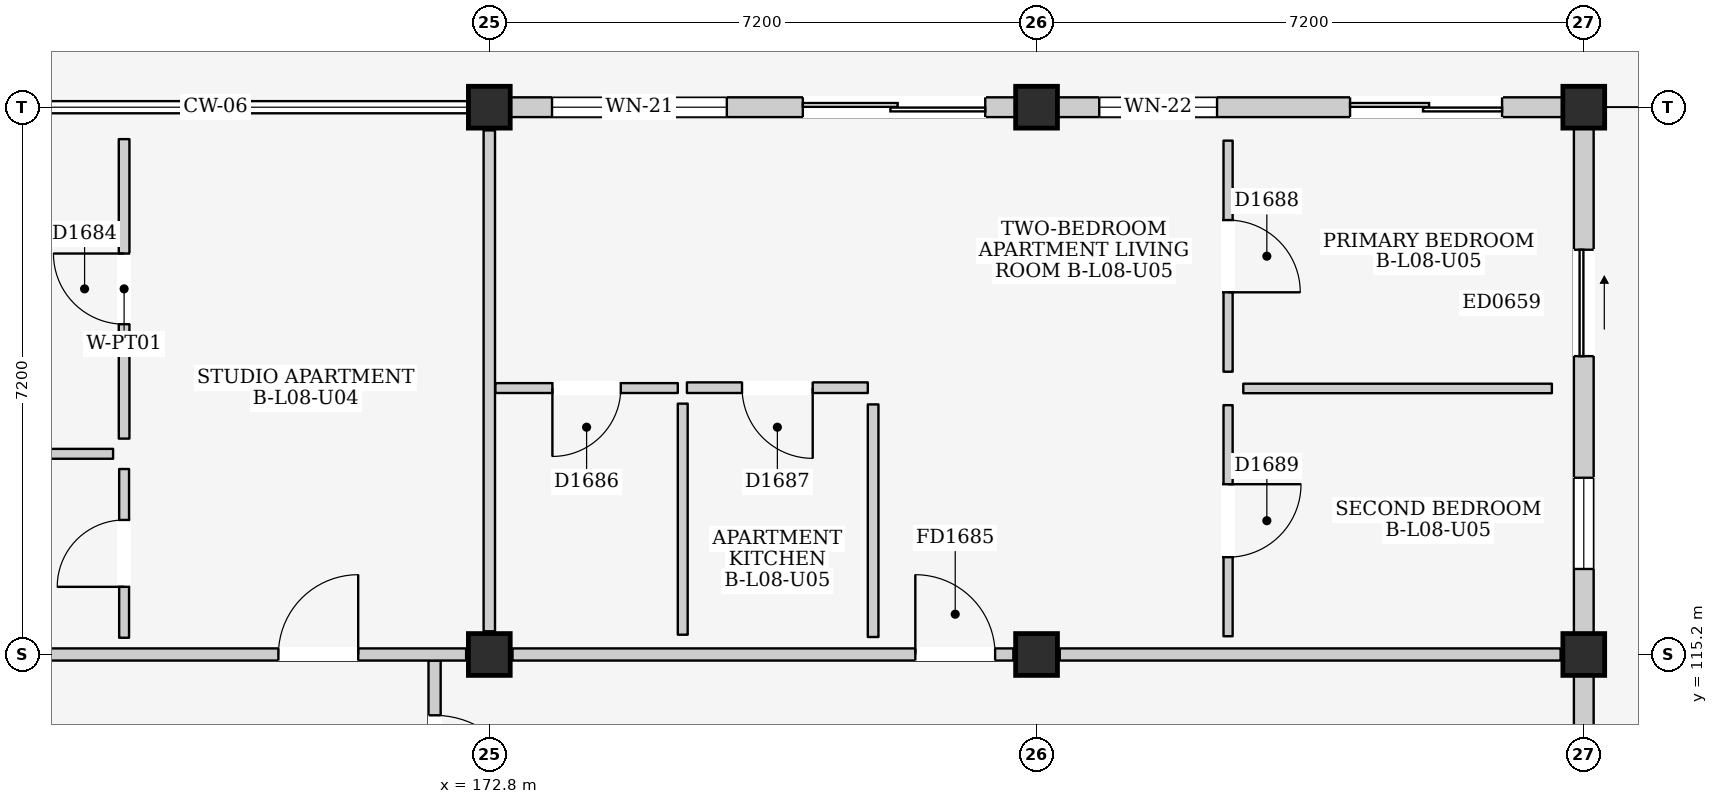
"""IFC4 building model, lengths in metres.
Left out: names, types, materials, properties, quantities, classifications, styles, units other than length and angle.
Written with IfcOpenShell. Run it as: python <this file> out.ifc"""

import sys

from ifc_helpers import new_model, si_unit, direction, frame, frame_2d, origin, origin_2d, place, context, subcontext, project, spatial, rectangle, extrude, element, fill, save


model = new_model("IFC4")
c1 = context("Model", 3, precision=1e-05, world=origin(), true_north=direction((0.0, 1.0)))
c2 = subcontext(c1, "Body", "Model", "MODEL_VIEW")
j1 = project(units=[si_unit("LENGTHUNIT", "METRE"), si_unit("PLANEANGLEUNIT", "RADIAN")], contexts=[c1])
p1 = place(None, origin())
s1 = spatial("IfcSite", under=j1, at=p1, CompositionType="ELEMENT")
p2 = place(p1, origin())
s2 = spatial("IfcBuilding", under=s1, at=p2, CompositionType="ELEMENT")
p3 = place(p2, frame((0.0, 0.0, 28.3)))
s3 = spatial("IfcBuildingStorey", under=s2, at=p3, CompositionType="ELEMENT", Elevation=28.3)
for number, where, z_axis, x_axis in (
    (1, (172.8, 115.2, 0.0), (0.0, 0.0, 1.0), (1.0, 0.0, 0.0)),
    (2, (172.8, 122.4, 0.0), (0.0, 0.0, 1.0), (1.0, 0.0, 0.0)),
    (3, (180.0, 115.2, 0.0), (0.0, 0.0, 1.0), (1.0, 0.0, 0.0)),
    (4, (180.0, 122.4, 0.0), (0.0, 0.0, 1.0), (1.0, 0.0, 0.0)),
    (5, (187.2, 115.2, 0.0), (0.0, 0.0, 1.0), (1.0, 0.0, 0.0)),
    (6, (187.2, 122.4, 0.0), (0.0, 0.0, 1.0), (1.0, 0.0, 0.0)),
):
    element("IfcColumn", number, at=place(p3, frame(where, z_axis=z_axis, x_axis=x_axis)), inside=s3, PredefinedType="COLUMN", context=c2, shape_type="SweptSolid", body=[
        extrude(rectangle(XDim=0.55, YDim=0.55, at=origin_2d()), origin(), (0.0, 0.0, 1.0), 3.2),
    ])
p4 = place(p3, frame((173.075, 122.4, 0.0), z_axis=(0.0, 0.0, 1.0), x_axis=(1.0, 0.0, 0.0)))
e7 = element("IfcWall", 7, at=p4, inside=s3, PredefinedType="ELEMENTEDWALL", context=c2, shape_type="SweptSolid", body=[
    extrude(rectangle(XDim=6.65, YDim=0.26, at=frame_2d((3.325, 0.0))), origin(), (0.0, 0.0, 1.0), 2.485),
])
p5 = place(p4, frame((3.85, 0.0, 0.0)))
e8 = element("IfcOpeningElement", 8, at=p5, cuts=e7, PredefinedType="OPENING", context=c2, shape_type="SweptSolid", body=[
    extrude(rectangle(XDim=2.4, YDim=2.12, at=frame_2d((1.2, 1.06))), frame((0.0, 0.145, 0.0), z_axis=(0.0, -1.0, 0.0), x_axis=(1.0, 0.0, 0.0)), (0.0, 0.0, 1.0), 0.29),
])
p6 = place(p4, frame((0.55, 0.0, 0.775)))
e9 = element("IfcOpeningElement", 9, at=p6, cuts=e7, PredefinedType="OPENING", context=c2, shape_type="SweptSolid", body=[
    extrude(rectangle(XDim=2.3, YDim=1.6, at=frame_2d((1.15, 0.8))), frame((0.0, 0.145, 0.0), z_axis=(0.0, -1.0, 0.0), x_axis=(1.0, 0.0, 0.0)), (0.0, 0.0, 1.0), 0.29),
])
p7 = place(p3, frame((187.2, 108.275, 0.0), z_axis=(0.0, 0.0, 1.0), x_axis=(0.0, 1.0, 0.0)))
e10 = element("IfcWall", 10, at=p7, inside=s3, PredefinedType="ELEMENTEDWALL", context=c2, shape_type="SweptSolid", body=[
    extrude(rectangle(XDim=6.65, YDim=0.26, at=frame_2d((3.325, 0.0))), origin(), (0.0, 0.0, 1.0), 2.485),
])
p8 = place(p7, frame((3.65, 0.0, 0.0)))
e11 = element("IfcOpeningElement", 11, at=p8, cuts=e10, PredefinedType="OPENING", context=c2, shape_type="SweptSolid", body=[
    extrude(rectangle(XDim=1.4, YDim=2.1, at=frame_2d((0.7, 1.05))), frame((0.0, 0.145, 0.0), z_axis=(0.0, -1.0, 0.0), x_axis=(1.0, 0.0, 0.0)), (0.0, 0.0, 1.0), 0.29),
])
p9 = place(p3, frame((180.275, 122.4, 0.0), z_axis=(0.0, 0.0, 1.0), x_axis=(1.0, 0.0, 0.0)))
e12 = element("IfcWall", 12, at=p9, inside=s3, PredefinedType="ELEMENTEDWALL", context=c2, shape_type="SweptSolid", body=[
    extrude(rectangle(XDim=6.65, YDim=0.26, at=frame_2d((3.325, 0.0))), origin(), (0.0, 0.0, 1.0), 2.485),
])
p10 = place(p9, frame((3.85, 0.0, 0.0)))
e13 = element("IfcOpeningElement", 13, at=p10, cuts=e12, PredefinedType="OPENING", context=c2, shape_type="SweptSolid", body=[
    extrude(rectangle(XDim=2.0, YDim=2.12, at=frame_2d((1.0, 1.06))), frame((0.0, 0.145, 0.0), z_axis=(0.0, -1.0, 0.0), x_axis=(1.0, 0.0, 0.0)), (0.0, 0.0, 1.0), 0.29),
])
p11 = place(p9, frame((0.55, 0.0, 0.9)))
e14 = element("IfcOpeningElement", 14, at=p11, cuts=e12, PredefinedType="OPENING", context=c2, shape_type="SweptSolid", body=[
    extrude(rectangle(XDim=1.55, YDim=1.45, at=frame_2d((0.775, 0.725))), frame((0.0, 0.145, 0.0), z_axis=(0.0, -1.0, 0.0), x_axis=(1.0, 0.0, 0.0)), (0.0, 0.0, 1.0), 0.29),
])
p12 = place(p3, frame((187.2, 115.475, 0.0), z_axis=(0.0, 0.0, 1.0), x_axis=(0.0, 1.0, 0.0)))
e15 = element("IfcWall", 15, at=p12, inside=s3, PredefinedType="ELEMENTEDWALL", context=c2, shape_type="SweptSolid", body=[
    extrude(rectangle(XDim=6.65, YDim=0.26, at=frame_2d((3.325, 0.0))), origin(), (0.0, 0.0, 1.0), 2.485),
])
p13 = place(p12, frame((3.65, 0.0, 0.0)))
e16 = element("IfcOpeningElement", 16, at=p13, cuts=e15, PredefinedType="OPENING", context=c2, shape_type="SweptSolid", body=[
    extrude(rectangle(XDim=1.4, YDim=2.1, at=frame_2d((0.7, 1.05))), frame((0.0, 0.145, 0.0), z_axis=(0.0, -1.0, 0.0), x_axis=(1.0, 0.0, 0.0)), (0.0, 0.0, 1.0), 0.29),
])
p14 = place(p12, frame((0.85, 0.0, 0.95)))
e17 = element("IfcOpeningElement", 17, at=p14, cuts=e15, PredefinedType="OPENING", context=c2, shape_type="SweptSolid", body=[
    extrude(rectangle(XDim=1.2, YDim=1.35, at=frame_2d((0.6, 0.675))), frame((0.0, 0.145, 0.0), z_axis=(0.0, -1.0, 0.0), x_axis=(1.0, 0.0, 0.0)), (0.0, 0.0, 1.0), 0.29),
])
p15 = place(p3, frame((172.08, 110.8, 0.0), z_axis=(0.0, 0.0, 1.0), x_axis=(0.0, 1.0, 0.0)))
e18 = element("IfcWall", 18, at=p15, inside=s3, PredefinedType="PARTITIONING", context=c2, shape_type="SweptSolid", body=[
    extrude(rectangle(XDim=4.32, YDim=0.16, at=frame_2d((2.16, 0.0))), origin(), (0.0, 0.0, 1.0), 2.95),
])
p16 = place(p15, frame((2.4, 0.0, 0.0)))
e19 = element("IfcOpeningElement", 19, at=p16, cuts=e18, PredefinedType="OPENING", context=c2, shape_type="SweptSolid", body=[
    extrude(rectangle(XDim=1.2, YDim=2.2, at=frame_2d((0.6, 1.1))), frame((0.0, 0.095, 0.0), z_axis=(0.0, -1.0, 0.0), x_axis=(1.0, 0.0, 0.0)), (0.0, 0.0, 1.0), 0.19),
])
p17 = place(p3, frame((165.905, 115.2, 0.0), z_axis=(0.0, 0.0, 1.0), x_axis=(1.0, 0.0, 0.0)))
e20 = element("IfcWall", 20, at=p17, inside=s3, PredefinedType="PARTITIONING", context=c2, shape_type="SweptSolid", body=[
    extrude(rectangle(XDim=6.59, YDim=0.16, at=frame_2d((3.295, 0.0))), origin(), (0.0, 0.0, 1.0), 2.335),
])
p18 = place(p17, frame((4.12, 0.0, 0.0)))
e21 = element("IfcOpeningElement", 21, at=p18, cuts=e20, PredefinedType="OPENING", context=c2, shape_type="SweptSolid", body=[
    extrude(rectangle(XDim=1.05, YDim=2.15, at=frame_2d((0.525, 1.075))), frame((0.0, 0.095, 0.0), z_axis=(0.0, -1.0, 0.0), x_axis=(1.0, 0.0, 0.0)), (0.0, 0.0, 1.0), 0.19),
])
p19 = place(p3, frame((172.8, 115.505, 0.0), z_axis=(0.0, 0.0, 1.0), x_axis=(0.0, 1.0, 0.0)))
e22 = element("IfcWall", 22, at=p19, inside=s3, PredefinedType="PARTITIONING", context=c2, shape_type="SweptSolid", body=[
    extrude(rectangle(XDim=6.59, YDim=0.15, at=frame_2d((3.295, 0.0))), origin(), (0.0, 0.0, 1.0), 2.435),
])
p20 = place(p3, frame((165.8, 117.84, 0.0), z_axis=(0.0, 0.0, 1.0), x_axis=(1.0, 0.0, 0.0)))
e23 = element("IfcWall", 23, at=p20, inside=s3, PredefinedType="PARTITIONING", context=c2, shape_type="SweptSolid", body=[
    extrude(rectangle(XDim=2.05, YDim=0.13, at=frame_2d((1.025, 0.0))), origin(), (0.0, 0.0, 1.0), 2.95),
])
p21 = place(p3, frame((167.995, 115.42, 0.0), z_axis=(0.0, 0.0, 1.0), x_axis=(0.0, 1.0, 0.0)))
e24 = element("IfcWall", 24, at=p21, inside=s3, PredefinedType="PARTITIONING", context=c2, shape_type="SweptSolid", body=[
    extrude(rectangle(XDim=2.22, YDim=0.13, at=frame_2d((1.11, 0.0))), origin(), (0.0, 0.0, 1.0), 2.95),
])
p22 = place(p21, frame((0.67, 0.0, 0.0)))
e25 = element("IfcOpeningElement", 25, at=p22, cuts=e24, PredefinedType="OPENING", context=c2, shape_type="SweptSolid", body=[
    extrude(rectangle(XDim=0.88, YDim=2.1, at=frame_2d((0.44, 1.05))), frame((0.0, 0.08, 0.0), z_axis=(0.0, -1.0, 0.0), x_axis=(1.0, 0.0, 0.0)), (0.0, 0.0, 1.0), 0.16),
])
p23 = place(p3, frame((167.995, 118.04, 0.0), z_axis=(0.0, 0.0, 1.0), x_axis=(0.0, 1.0, 0.0)))
e26 = element("IfcWall", 26, at=p23, inside=s3, PredefinedType="PARTITIONING", context=c2, shape_type="SweptSolid", body=[
    extrude(rectangle(XDim=3.94, YDim=0.14, at=frame_2d((1.97, 0.0))), origin(), (0.0, 0.0, 1.0), 2.95),
])
p24 = place(p23, frame((1.505, 0.0, 0.0)))
e27 = element("IfcOpeningElement", 27, at=p24, cuts=e26, PredefinedType="OPENING", context=c2, shape_type="SweptSolid", body=[
    extrude(rectangle(XDim=0.93, YDim=2.14, at=frame_2d((0.465, 1.07))), frame((0.0, 0.085, 0.0), z_axis=(0.0, -1.0, 0.0), x_axis=(1.0, 0.0, 0.0)), (0.0, 0.0, 1.0), 0.17),
])
p25 = place(p3, frame((173.105, 115.2, 0.0), z_axis=(0.0, 0.0, 1.0), x_axis=(1.0, 0.0, 0.0)))
e28 = element("IfcWall", 28, at=p25, inside=s3, PredefinedType="PARTITIONING", context=c2, shape_type="SweptSolid", body=[
    extrude(rectangle(XDim=6.59, YDim=0.16, at=frame_2d((3.295, 0.0))), origin(), (0.0, 0.0, 1.0), 2.335),
])
p26 = place(p25, frame((5.3, 0.0, 0.0)))
e29 = element("IfcOpeningElement", 29, at=p26, cuts=e28, PredefinedType="OPENING", context=c2, shape_type="SweptSolid", body=[
    extrude(rectangle(XDim=1.05, YDim=2.15, at=frame_2d((0.525, 1.075))), frame((0.0, 0.095, 0.0), z_axis=(0.0, -1.0, 0.0), x_axis=(1.0, 0.0, 0.0)), (0.0, 0.0, 1.0), 0.19),
])
p27 = place(p3, frame((180.305, 115.2, 0.0), z_axis=(0.0, 0.0, 1.0), x_axis=(1.0, 0.0, 0.0)))
e30 = element("IfcWall", 30, at=p27, inside=s3, PredefinedType="PARTITIONING", context=c2, shape_type="SweptSolid", body=[
    extrude(rectangle(XDim=6.59, YDim=0.16, at=frame_2d((3.295, 0.0))), origin(), (0.0, 0.0, 1.0), 2.335),
])
p28 = place(p3, frame((172.88, 118.705, 0.0), z_axis=(0.0, 0.0, 1.0), x_axis=(1.0, 0.0, 0.0)))
e31 = element("IfcWall", 31, at=p28, inside=s3, PredefinedType="PARTITIONING", context=c2, shape_type="SweptSolid", body=[
    extrude(rectangle(XDim=2.4, YDim=0.13, at=frame_2d((1.2, 0.0))), origin(), (0.0, 0.0, 1.0), 2.95),
])
p29 = place(p28, frame((0.75, 0.0, 0.0)))
e32 = element("IfcOpeningElement", 32, at=p29, cuts=e31, PredefinedType="OPENING", context=c2, shape_type="SweptSolid", body=[
    extrude(rectangle(XDim=0.9, YDim=2.1, at=frame_2d((0.45, 1.05))), frame((0.0, 0.08, 0.0), z_axis=(0.0, -1.0, 0.0), x_axis=(1.0, 0.0, 0.0)), (0.0, 0.0, 1.0), 0.16),
])
p30 = place(p3, frame((175.345, 115.46, 0.0), z_axis=(0.0, 0.0, 1.0), x_axis=(0.0, 1.0, 0.0)))
e33 = element("IfcWall", 33, at=p30, inside=s3, PredefinedType="PARTITIONING", context=c2, shape_type="SweptSolid", body=[
    extrude(rectangle(XDim=3.04, YDim=0.13, at=frame_2d((1.52, 0.0))), origin(), (0.0, 0.0, 1.0), 2.95),
])
p31 = place(p3, frame((175.4, 118.71, 0.0), z_axis=(0.0, 0.0, 1.0), x_axis=(1.0, 0.0, 0.0)))
e34 = element("IfcWall", 34, at=p31, inside=s3, PredefinedType="PARTITIONING", context=c2, shape_type="SweptSolid", body=[
    extrude(rectangle(XDim=2.38, YDim=0.14, at=frame_2d((1.19, 0.0))), origin(), (0.0, 0.0, 1.0), 2.95),
])
p32 = place(p31, frame((0.725, 0.0, 0.0)))
e35 = element("IfcOpeningElement", 35, at=p32, cuts=e34, PredefinedType="OPENING", context=c2, shape_type="SweptSolid", body=[
    extrude(rectangle(XDim=0.93, YDim=2.14, at=frame_2d((0.465, 1.07))), frame((0.0, 0.085, 0.0), z_axis=(0.0, -1.0, 0.0), x_axis=(1.0, 0.0, 0.0)), (0.0, 0.0, 1.0), 0.17),
])
p33 = place(p3, frame((177.85, 115.43, 0.0), z_axis=(0.0, 0.0, 1.0), x_axis=(0.0, 1.0, 0.0)))
e36 = element("IfcWall", 36, at=p33, inside=s3, PredefinedType="PARTITIONING", context=c2, shape_type="SweptSolid", body=[
    extrude(rectangle(XDim=3.06, YDim=0.14, at=frame_2d((1.53, 0.0))), origin(), (0.0, 0.0, 1.0), 2.95),
])
p34 = place(p3, frame((182.52, 118.92, 0.0), z_axis=(0.0, 0.0, 1.0), x_axis=(0.0, 1.0, 0.0)))
e37 = element("IfcWall", 37, at=p34, inside=s3, PredefinedType="PARTITIONING", context=c2, shape_type="SweptSolid", body=[
    extrude(rectangle(XDim=3.04, YDim=0.12, at=frame_2d((1.52, 0.0))), origin(), (0.0, 0.0, 1.0), 2.95),
])
p35 = place(p34, frame((1.045, 0.0, 0.0)))
e38 = element("IfcOpeningElement", 38, at=p35, cuts=e37, PredefinedType="OPENING", context=c2, shape_type="SweptSolid", body=[
    extrude(rectangle(XDim=0.95, YDim=2.15, at=frame_2d((0.475, 1.075))), frame((0.0, 0.075, 0.0), z_axis=(0.0, -1.0, 0.0), x_axis=(1.0, 0.0, 0.0)), (0.0, 0.0, 1.0), 0.15),
])
p36 = place(p3, frame((182.72, 118.7, 0.0), z_axis=(0.0, 0.0, 1.0), x_axis=(1.0, 0.0, 0.0)))
e39 = element("IfcWall", 39, at=p36, inside=s3, PredefinedType="PARTITIONING", context=c2, shape_type="SweptSolid", body=[
    extrude(rectangle(XDim=4.06, YDim=0.125, at=frame_2d((2.03, 0.0))), origin(), (0.0, 0.0, 1.0), 2.95),
])
p37 = place(p3, frame((182.52, 115.44, 0.0), z_axis=(0.0, 0.0, 1.0), x_axis=(0.0, 1.0, 0.0)))
e40 = element("IfcWall", 40, at=p37, inside=s3, PredefinedType="PARTITIONING", context=c2, shape_type="SweptSolid", body=[
    extrude(rectangle(XDim=3.04, YDim=0.12, at=frame_2d((1.52, 0.0))), origin(), (0.0, 0.0, 1.0), 2.95),
])
p38 = place(p37, frame((1.04, 0.0, 0.0)))
e41 = element("IfcOpeningElement", 41, at=p38, cuts=e40, PredefinedType="OPENING", context=c2, shape_type="SweptSolid", body=[
    extrude(rectangle(XDim=0.96, YDim=2.15, at=frame_2d((0.48, 1.075))), frame((0.0, 0.075, 0.0), z_axis=(0.0, -1.0, 0.0), x_axis=(1.0, 0.0, 0.0)), (0.0, 0.0, 1.0), 0.15),
])
p39 = place(p5, frame((2.4, 0.0, 0.0), z_axis=(0.0, 0.0, 1.0), x_axis=(-1.0, 0.0, 0.0)))
e42 = element("IfcDoor", 42, at=p39, inside=s3, OperationType="DOUBLE_DOOR_SLIDING", PredefinedType="DOOR", context=c2, shape_type="SweptSolid", body=[
    extrude(rectangle(XDim=2.4, YDim=2.12, at=frame_2d((1.2, 1.06))), frame((0.0, 0.025, 0.0), z_axis=(0.0, -1.0, 0.0), x_axis=(1.0, 0.0, 0.0)), (0.0, 0.0, 1.0), 0.05),
])
fill(e8, e42)
p40 = place(p6, origin())
e43 = element("IfcWindow", 43, at=p40, inside=s3, PartitioningType="TRIPLE_PANEL_VERTICAL", PredefinedType="WINDOW", context=c2, shape_type="SweptSolid", body=[
    extrude(rectangle(XDim=2.3, YDim=1.6, at=frame_2d((1.15, 0.8))), frame((0.0, 0.03, 0.0), z_axis=(0.0, -1.0, 0.0), x_axis=(1.0, 0.0, 0.0)), (0.0, 0.0, 1.0), 0.06),
])
fill(e9, e43)
p41 = place(p10, frame((2.0, 0.0, 0.0), z_axis=(0.0, 0.0, 1.0), x_axis=(-1.0, 0.0, 0.0)))
e44 = element("IfcDoor", 44, at=p41, inside=s3, OperationType="DOUBLE_DOOR_SLIDING", PredefinedType="DOOR", context=c2, shape_type="SweptSolid", body=[
    extrude(rectangle(XDim=2.0, YDim=2.12, at=frame_2d((1.0, 1.06))), frame((0.0, 0.025, 0.0), z_axis=(0.0, -1.0, 0.0), x_axis=(1.0, 0.0, 0.0)), (0.0, 0.0, 1.0), 0.05),
])
fill(e13, e44)
p42 = place(p11, origin())
e45 = element("IfcWindow", 45, at=p42, inside=s3, PartitioningType="DOUBLE_PANEL_VERTICAL", PredefinedType="WINDOW", context=c2, shape_type="SweptSolid", body=[
    extrude(rectangle(XDim=1.55, YDim=1.45, at=frame_2d((0.775, 0.725))), frame((0.0, 0.03, 0.0), z_axis=(0.0, -1.0, 0.0), x_axis=(1.0, 0.0, 0.0)), (0.0, 0.0, 1.0), 0.06),
])
fill(e14, e45)
p43 = place(p13, frame((1.4, 0.0, 0.0), z_axis=(0.0, 0.0, 1.0), x_axis=(-1.0, 0.0, 0.0)))
e46 = element("IfcDoor", 46, at=p43, inside=s3, OperationType="SLIDING_TO_RIGHT", PredefinedType="DOOR", context=c2, shape_type="SweptSolid", body=[
    extrude(rectangle(XDim=1.4, YDim=2.1, at=frame_2d((0.7, 1.05))), frame((0.0, 0.025, 0.0), z_axis=(0.0, -1.0, 0.0), x_axis=(1.0, 0.0, 0.0)), (0.0, 0.0, 1.0), 0.05),
])
fill(e16, e46)
p44 = place(p14, origin())
e47 = element("IfcWindow", 47, at=p44, inside=s3, PartitioningType="SINGLE_PANEL", PredefinedType="WINDOW", context=c2, shape_type="SweptSolid", body=[
    extrude(rectangle(XDim=1.2, YDim=1.35, at=frame_2d((0.6, 0.675))), frame((0.0, 0.03, 0.0), z_axis=(0.0, -1.0, 0.0), x_axis=(1.0, 0.0, 0.0)), (0.0, 0.0, 1.0), 0.06),
])
fill(e17, e47)
p45 = place(p16, frame((1.2, 0.0, 0.0), z_axis=(0.0, 0.0, 1.0), x_axis=(-1.0, 0.0, 0.0)))
e48 = element("IfcDoor", 48, at=p45, inside=s3, OperationType="SINGLE_SWING_RIGHT", PredefinedType="DOOR", context=c2, shape_type="SweptSolid", body=[
    extrude(rectangle(XDim=1.2, YDim=2.2, at=frame_2d((0.6, 1.1))), frame((0.0, 0.025, 0.0), z_axis=(0.0, -1.0, 0.0), x_axis=(1.0, 0.0, 0.0)), (0.0, 0.0, 1.0), 0.05),
])
fill(e19, e48)
p46 = place(p18, origin())
e49 = element("IfcDoor", 49, at=p46, inside=s3, OperationType="SINGLE_SWING_RIGHT", PredefinedType="DOOR", context=c2, shape_type="SweptSolid", body=[
    extrude(rectangle(XDim=1.05, YDim=2.15, at=frame_2d((0.525, 1.075))), frame((0.0, 0.025, 0.0), z_axis=(0.0, -1.0, 0.0), x_axis=(1.0, 0.0, 0.0)), (0.0, 0.0, 1.0), 0.05),
])
fill(e21, e49)
p47 = place(p22, origin())
e50 = element("IfcDoor", 50, at=p47, inside=s3, OperationType="SINGLE_SWING_LEFT", PredefinedType="DOOR", context=c2, shape_type="SweptSolid", body=[
    extrude(rectangle(XDim=0.88, YDim=2.1, at=frame_2d((0.44, 1.05))), frame((0.0, 0.025, 0.0), z_axis=(0.0, -1.0, 0.0), x_axis=(1.0, 0.0, 0.0)), (0.0, 0.0, 1.0), 0.05),
])
fill(e25, e50)
p48 = place(p24, origin())
e51 = element("IfcDoor", 51, at=p48, inside=s3, OperationType="SINGLE_SWING_RIGHT", PredefinedType="DOOR", context=c2, shape_type="SweptSolid", body=[
    extrude(rectangle(XDim=0.93, YDim=2.14, at=frame_2d((0.465, 1.07))), frame((0.0, 0.025, 0.0), z_axis=(0.0, -1.0, 0.0), x_axis=(1.0, 0.0, 0.0)), (0.0, 0.0, 1.0), 0.05),
])
fill(e27, e51)
p49 = place(p26, origin())
e52 = element("IfcDoor", 52, at=p49, inside=s3, OperationType="SINGLE_SWING_LEFT", PredefinedType="DOOR", context=c2, shape_type="SweptSolid", body=[
    extrude(rectangle(XDim=1.05, YDim=2.15, at=frame_2d((0.525, 1.075))), frame((0.0, 0.025, 0.0), z_axis=(0.0, -1.0, 0.0), x_axis=(1.0, 0.0, 0.0)), (0.0, 0.0, 1.0), 0.05),
])
fill(e29, e52)
p50 = place(p29, frame((0.9, 0.0, 0.0), z_axis=(0.0, 0.0, 1.0), x_axis=(-1.0, 0.0, 0.0)))
e53 = element("IfcDoor", 53, at=p50, inside=s3, OperationType="SINGLE_SWING_RIGHT", PredefinedType="DOOR", context=c2, shape_type="SweptSolid", body=[
    extrude(rectangle(XDim=0.9, YDim=2.1, at=frame_2d((0.45, 1.05))), frame((0.0, 0.025, 0.0), z_axis=(0.0, -1.0, 0.0), x_axis=(1.0, 0.0, 0.0)), (0.0, 0.0, 1.0), 0.05),
])
fill(e32, e53)
p51 = place(p32, frame((0.93, 0.0, 0.0), z_axis=(0.0, 0.0, 1.0), x_axis=(-1.0, 0.0, 0.0)))
e54 = element("IfcDoor", 54, at=p51, inside=s3, OperationType="SINGLE_SWING_LEFT", PredefinedType="DOOR", context=c2, shape_type="SweptSolid", body=[
    extrude(rectangle(XDim=0.93, YDim=2.14, at=frame_2d((0.465, 1.07))), frame((0.0, 0.025, 0.0), z_axis=(0.0, -1.0, 0.0), x_axis=(1.0, 0.0, 0.0)), (0.0, 0.0, 1.0), 0.05),
])
fill(e35, e54)
p52 = place(p35, frame((0.95, 0.0, 0.0), z_axis=(0.0, 0.0, 1.0), x_axis=(-1.0, 0.0, 0.0)))
e55 = element("IfcDoor", 55, at=p52, inside=s3, OperationType="SINGLE_SWING_RIGHT", PredefinedType="DOOR", context=c2, shape_type="SweptSolid", body=[
    extrude(rectangle(XDim=0.95, YDim=2.15, at=frame_2d((0.475, 1.075))), frame((0.0, 0.025, 0.0), z_axis=(0.0, -1.0, 0.0), x_axis=(1.0, 0.0, 0.0)), (0.0, 0.0, 1.0), 0.05),
])
fill(e38, e55)
p53 = place(p38, frame((0.96, 0.0, 0.0), z_axis=(0.0, 0.0, 1.0), x_axis=(-1.0, 0.0, 0.0)))
e56 = element("IfcDoor", 56, at=p53, inside=s3, OperationType="SINGLE_SWING_LEFT", PredefinedType="DOOR", context=c2, shape_type="SweptSolid", body=[
    extrude(rectangle(XDim=0.96, YDim=2.15, at=frame_2d((0.48, 1.075))), frame((0.0, 0.025, 0.0), z_axis=(0.0, -1.0, 0.0), x_axis=(1.0, 0.0, 0.0)), (0.0, 0.0, 1.0), 0.05),
])
fill(e41, e56)
save(model, sys.argv[1])
